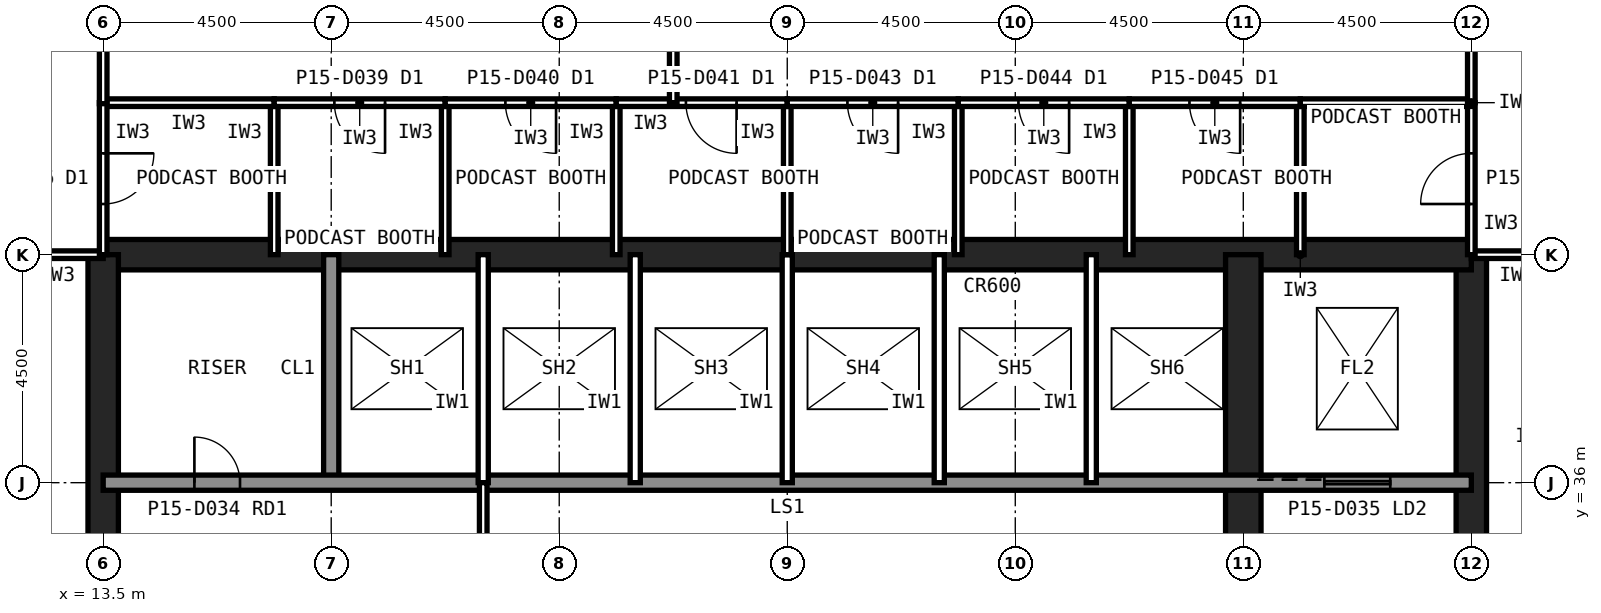
"""IFC4 building model, lengths in metres.
Left out: names, types, materials, properties, quantities, classifications, styles, units other than length and angle.
Written with IfcOpenShell. Run it as: python <this file> out.ifc"""

import sys

from ifc_helpers import new_model, si_unit, direction, frame, frame_2d, origin, place, context, subcontext, project, spatial, rectangle, extrude, element, fill, save


model = new_model("IFC4")
c1 = context("Model", 3, precision=1e-05, world=origin(), true_north=direction((0.0, 1.0)))
c2 = subcontext(c1, "Body", "Model", "MODEL_VIEW")
j1 = project(units=[si_unit("LENGTHUNIT", "METRE"), si_unit("PLANEANGLEUNIT", "RADIAN")], contexts=[c1])
p1 = place(None, origin())
s1 = spatial("IfcSite", under=j1, at=p1, CompositionType="ELEMENT")
p2 = place(p1, origin())
s2 = spatial("IfcBuilding", under=s1, at=p2, CompositionType="ELEMENT")
p3 = place(p2, frame((0.0, 0.0, 62.6)))
s3 = spatial("IfcBuildingStorey", under=s2, at=p3, CompositionType="ELEMENT", Elevation=62.6)
p4 = place(p3, frame((40.5, 13.5, 0.0), z_axis=(0.0, 0.0, 1.0), x_axis=(0.0, 1.0, 0.0)))
e1 = element("IfcWall", 1, at=p4, inside=s3, PredefinedType="SHEAR", context=c2, shape_type="SweptSolid", body=[
    extrude(rectangle(XDim=27.0, YDim=0.6, at=frame_2d((13.5, 0.0))), origin(), (0.0, 0.0, 1.0), 4.2),
])
p5 = place(p4, frame((5.85, 0.0, 0.0)))
e2 = element("IfcOpeningElement", 2, at=p5, cuts=e1, PredefinedType="OPENING", context=c2, shape_type="SweptSolid", body=[
    extrude(rectangle(XDim=1.8, YDim=2.1, at=frame_2d((0.9, 1.05))), frame((0.0, 0.31, 0.0), z_axis=(0.0, -1.0, 0.0), x_axis=(1.0, 0.0, 0.0)), (0.0, 0.0, 1.0), 0.62),
])
p6 = place(p4, frame((19.65, 0.0, 0.0)))
e3 = element("IfcOpeningElement", 3, at=p6, cuts=e1, PredefinedType="OPENING", context=c2, shape_type="SweptSolid", body=[
    extrude(rectangle(XDim=1.2, YDim=2.1, at=frame_2d((0.6, 1.05))), frame((0.0, 0.31, 0.0), z_axis=(0.0, -1.0, 0.0), x_axis=(1.0, 0.0, 0.0)), (0.0, 0.0, 1.0), 0.62),
])
p7 = place(p3, frame((40.5, 40.5, 0.0), z_axis=(0.0, 0.0, 1.0), x_axis=(-1.0, 0.0, 0.0)))
e4 = element("IfcWall", 4, at=p7, inside=s3, PredefinedType="SHEAR", context=c2, shape_type="SweptSolid", body=[
    extrude(rectangle(XDim=27.0, YDim=0.6, at=frame_2d((13.5, 0.0))), origin(), (0.0, 0.0, 1.0), 4.2),
])
p8 = place(p3, frame((13.5, 40.5, 0.0), z_axis=(0.0, 0.0, 1.0), x_axis=(0.0, -1.0, 0.0)))
e5 = element("IfcWall", 5, at=p8, inside=s3, PredefinedType="SHEAR", context=c2, shape_type="SweptSolid", body=[
    extrude(rectangle(XDim=27.0, YDim=0.6, at=frame_2d((13.5, 0.0))), origin(), (0.0, 0.0, 1.0), 4.2),
])
p9 = place(p8, frame((19.65, 0.0, 0.0)))
e6 = element("IfcOpeningElement", 6, at=p9, cuts=e5, PredefinedType="OPENING", context=c2, shape_type="SweptSolid", body=[
    extrude(rectangle(XDim=1.2, YDim=2.1, at=frame_2d((0.6, 1.05))), frame((0.0, 0.31, 0.0), z_axis=(0.0, -1.0, 0.0), x_axis=(1.0, 0.0, 0.0)), (0.0, 0.0, 1.0), 0.62),
])
p10 = place(p8, frame((5.85, 0.0, 0.0)))
e7 = element("IfcOpeningElement", 7, at=p10, cuts=e5, PredefinedType="OPENING", context=c2, shape_type="SweptSolid", body=[
    extrude(rectangle(XDim=1.8, YDim=2.1, at=frame_2d((0.9, 1.05))), frame((0.0, 0.31, 0.0), z_axis=(0.0, -1.0, 0.0), x_axis=(1.0, 0.0, 0.0)), (0.0, 0.0, 1.0), 0.62),
])
p11 = place(p3, frame((18.0, 36.0, 0.0), z_axis=(0.0, 0.0, 1.0), x_axis=(0.0, 1.0, 0.0)))
e8 = element("IfcWall", 8, at=p11, inside=s3, PredefinedType="SOLIDWALL", context=c2, shape_type="SweptSolid", body=[
    extrude(rectangle(XDim=4.5, YDim=0.3, at=frame_2d((2.25, 0.0))), origin(), (0.0, 0.0, 1.0), 4.04),
])
p12 = place(p3, frame((36.0, 22.5, 0.0), z_axis=(0.0, 0.0, 1.0), x_axis=(0.0, 1.0, 0.0)))
e9 = element("IfcWall", 9, at=p12, inside=s3, PredefinedType="SHEAR", context=c2, shape_type="SweptSolid", body=[
    extrude(rectangle(XDim=18.0, YDim=0.7, at=frame_2d((9.0, 0.0))), origin(), (0.0, 0.0, 1.0), 4.2),
])
p13 = place(p3, frame((13.5, 36.0, 0.0), z_axis=(0.0, 0.0, 1.0), x_axis=(1.0, 0.0, 0.0)))
e10 = element("IfcWall", 10, at=p13, inside=s3, PredefinedType="SOLIDWALL", context=c2, shape_type="SweptSolid", body=[
    extrude(rectangle(XDim=27.0, YDim=0.3, at=frame_2d((13.5, 0.0))), origin(), (0.0, 0.0, 1.0), 4.04),
])
p14 = place(p13, frame((1.8, 0.0, 0.0)))
e11 = element("IfcOpeningElement", 11, at=p14, cuts=e10, PredefinedType="OPENING", context=c2, shape_type="SweptSolid", body=[
    extrude(rectangle(XDim=0.9, YDim=2.1, at=frame_2d((0.45, 1.05))), frame((0.0, 0.16, 0.0), z_axis=(0.0, -1.0, 0.0), x_axis=(1.0, 0.0, 0.0)), (0.0, 0.0, 1.0), 0.32),
])
p15 = place(p13, frame((24.1, 0.0, 0.0)))
e12 = element("IfcOpeningElement", 12, at=p15, cuts=e10, PredefinedType="OPENING", context=c2, shape_type="SweptSolid", body=[
    extrude(rectangle(XDim=1.3, YDim=2.2, at=frame_2d((0.65, 1.1))), frame((0.0, 0.16, 0.0), z_axis=(0.0, -1.0, 0.0), x_axis=(1.0, 0.0, 0.0)), (0.0, 0.0, 1.0), 0.32),
])
for number, where, z_axis, x_axis in (
    (13, (21.0, 36.0, 0.0), (0.0, 0.0, 1.0), (0.0, 1.0, 0.0)),
    (14, (24.0, 36.0, 0.0), (0.0, 0.0, 1.0), (0.0, 1.0, 0.0)),
    (15, (27.0, 36.0, 0.0), (0.0, 0.0, 1.0), (0.0, 1.0, 0.0)),
    (16, (30.0, 36.0, 0.0), (0.0, 0.0, 1.0), (0.0, 1.0, 0.0)),
    (17, (33.0, 36.0, 0.0), (0.0, 0.0, 1.0), (0.0, 1.0, 0.0)),
):
    element("IfcWall", number, at=place(p3, frame(where, z_axis=z_axis, x_axis=x_axis)), inside=s3, PredefinedType="PARTITIONING", context=c2, shape_type="SweptSolid", body=[
        extrude(rectangle(XDim=4.5, YDim=0.2, at=frame_2d((2.25, 0.0))), origin(), (0.0, 0.0, 1.0), 4.04),
    ])
for number, where, z_axis, x_axis in (
    (18, (18.0, 33.3, 0.0), (0.0, 0.0, 1.0), (0.0, 1.0, 0.0)),
    (19, (24.0, 33.3, 0.0), (0.0, 0.0, 1.0), (0.0, 1.0, 0.0)),
    (20, (30.0, 33.3, 0.0), (0.0, 0.0, 1.0), (0.0, 1.0, 0.0)),
):
    element("IfcWall", number, at=place(p3, frame(where, z_axis=z_axis, x_axis=x_axis)), inside=s3, PredefinedType="PARTITIONING", context=c2, shape_type="SweptSolid", body=[
        extrude(rectangle(XDim=2.7, YDim=0.15, at=frame_2d((1.35, 0.0))), origin(), (0.0, 0.0, 1.0), 4.04),
    ])
for number, where, z_axis, x_axis in (
    (21, (13.5, 40.5, 0.0), (0.0, 0.0, 1.0), (-1.0, 0.0, 0.0)),
    (22, (42.3, 40.5, 0.0), (0.0, 0.0, 1.0), (-1.0, 0.0, 0.0)),
):
    element("IfcWall", number, at=place(p3, frame(where, z_axis=z_axis, x_axis=x_axis)), inside=s3, PredefinedType="PARTITIONING", context=c2, shape_type="SweptSolid", body=[
        extrude(rectangle(XDim=1.8, YDim=0.15, at=frame_2d((0.9, 0.0))), origin(), (0.0, 0.0, 1.0), 3.189),
    ])
p16 = place(p3, frame((16.875, 40.5, 0.0), z_axis=(0.0, 0.0, 1.0), x_axis=(0.0, 1.0, 0.0)))
e23 = element("IfcWall", 23, at=p16, inside=s3, PredefinedType="PARTITIONING", context=c2, shape_type="SweptSolid", body=[
    extrude(rectangle(XDim=3.0, YDim=0.15, at=frame_2d((1.5, 0.0))), origin(), (0.0, 0.0, 1.0), 4.04),
])
p17 = place(p3, frame((16.875, 43.5, 0.0), z_axis=(0.0, 0.0, 1.0), x_axis=(-1.0, 0.0, 0.0)))
e24 = element("IfcWall", 24, at=p17, inside=s3, PredefinedType="PARTITIONING", context=c2, shape_type="SweptSolid", body=[
    extrude(rectangle(XDim=3.375, YDim=0.15, at=frame_2d((1.688, 0.0))), origin(), (0.0, 0.0, 1.0), 4.04),
])
p18 = place(p3, frame((13.5, 43.5, 0.0), z_axis=(0.0, 0.0, 1.0), x_axis=(0.0, -1.0, 0.0)))
e25 = element("IfcWall", 25, at=p18, inside=s3, PredefinedType="PARTITIONING", context=c2, shape_type="SweptSolid", body=[
    extrude(rectangle(XDim=3.0, YDim=0.15, at=frame_2d((1.5, 0.0))), origin(), (0.0, 0.0, 1.0), 3.189),
])
p19 = place(p18, frame((1.0, 0.0, 0.0)))
e26 = element("IfcOpeningElement", 26, at=p19, cuts=e25, PredefinedType="OPENING", context=c2, shape_type="SweptSolid", body=[
    extrude(rectangle(XDim=1.0, YDim=2.1, at=frame_2d((0.5, 1.05))), frame((0.0, 0.085, 0.0), z_axis=(0.0, -1.0, 0.0), x_axis=(1.0, 0.0, 0.0)), (0.0, 0.0, 1.0), 0.17),
])
p20 = place(p3, frame((20.25, 40.5, 0.0), z_axis=(0.0, 0.0, 1.0), x_axis=(0.0, 1.0, 0.0)))
e27 = element("IfcWall", 27, at=p20, inside=s3, PredefinedType="PARTITIONING", context=c2, shape_type="SweptSolid", body=[
    extrude(rectangle(XDim=3.0, YDim=0.15, at=frame_2d((1.5, 0.0))), origin(), (0.0, 0.0, 1.0), 4.04),
])
p21 = place(p3, frame((20.25, 43.5, 0.0), z_axis=(0.0, 0.0, 1.0), x_axis=(-1.0, 0.0, 0.0)))
e28 = element("IfcWall", 28, at=p21, inside=s3, PredefinedType="PARTITIONING", context=c2, shape_type="SweptSolid", body=[
    extrude(rectangle(XDim=3.375, YDim=0.15, at=frame_2d((1.688, 0.0))), origin(), (0.0, 0.0, 1.0), 4.04),
])
p22 = place(p21, frame((1.188, 0.0, 0.0)))
e29 = element("IfcOpeningElement", 29, at=p22, cuts=e28, PredefinedType="OPENING", context=c2, shape_type="SweptSolid", body=[
    extrude(rectangle(XDim=1.0, YDim=2.1, at=frame_2d((0.5, 1.05))), frame((0.0, 0.085, 0.0), z_axis=(0.0, -1.0, 0.0), x_axis=(1.0, 0.0, 0.0)), (0.0, 0.0, 1.0), 0.17),
])
p23 = place(p3, frame((23.625, 40.5, 0.0), z_axis=(0.0, 0.0, 1.0), x_axis=(0.0, 1.0, 0.0)))
e30 = element("IfcWall", 30, at=p23, inside=s3, PredefinedType="PARTITIONING", context=c2, shape_type="SweptSolid", body=[
    extrude(rectangle(XDim=3.0, YDim=0.15, at=frame_2d((1.5, 0.0))), origin(), (0.0, 0.0, 1.0), 4.04),
])
p24 = place(p3, frame((23.625, 43.5, 0.0), z_axis=(0.0, 0.0, 1.0), x_axis=(-1.0, 0.0, 0.0)))
e31 = element("IfcWall", 31, at=p24, inside=s3, PredefinedType="PARTITIONING", context=c2, shape_type="SweptSolid", body=[
    extrude(rectangle(XDim=3.375, YDim=0.15, at=frame_2d((1.688, 0.0))), origin(), (0.0, 0.0, 1.0), 4.04),
])
p25 = place(p24, frame((1.188, 0.0, 0.0)))
e32 = element("IfcOpeningElement", 32, at=p25, cuts=e31, PredefinedType="OPENING", context=c2, shape_type="SweptSolid", body=[
    extrude(rectangle(XDim=1.0, YDim=2.1, at=frame_2d((0.5, 1.05))), frame((0.0, 0.085, 0.0), z_axis=(0.0, -1.0, 0.0), x_axis=(1.0, 0.0, 0.0)), (0.0, 0.0, 1.0), 0.17),
])
p26 = place(p3, frame((27.0, 40.5, 0.0), z_axis=(0.0, 0.0, 1.0), x_axis=(0.0, 1.0, 0.0)))
e33 = element("IfcWall", 33, at=p26, inside=s3, PredefinedType="PARTITIONING", context=c2, shape_type="SweptSolid", body=[
    extrude(rectangle(XDim=3.0, YDim=0.15, at=frame_2d((1.5, 0.0))), origin(), (0.0, 0.0, 1.0), 3.189),
])
p27 = place(p3, frame((27.0, 43.5, 0.0), z_axis=(0.0, 0.0, 1.0), x_axis=(-1.0, 0.0, 0.0)))
e34 = element("IfcWall", 34, at=p27, inside=s3, PredefinedType="PARTITIONING", context=c2, shape_type="SweptSolid", body=[
    extrude(rectangle(XDim=3.375, YDim=0.15, at=frame_2d((1.688, 0.0))), origin(), (0.0, 0.0, 1.0), 4.04),
])
p28 = place(p27, frame((1.0, 0.0, 0.0)))
e35 = element("IfcOpeningElement", 35, at=p28, cuts=e34, PredefinedType="OPENING", context=c2, shape_type="SweptSolid", body=[
    extrude(rectangle(XDim=1.0, YDim=2.1, at=frame_2d((0.5, 1.05))), frame((0.0, 0.085, 0.0), z_axis=(0.0, -1.0, 0.0), x_axis=(1.0, 0.0, 0.0)), (0.0, 0.0, 1.0), 0.17),
])
p29 = place(p3, frame((30.375, 40.5, 0.0), z_axis=(0.0, 0.0, 1.0), x_axis=(0.0, 1.0, 0.0)))
e36 = element("IfcWall", 36, at=p29, inside=s3, PredefinedType="PARTITIONING", context=c2, shape_type="SweptSolid", body=[
    extrude(rectangle(XDim=3.0, YDim=0.15, at=frame_2d((1.5, 0.0))), origin(), (0.0, 0.0, 1.0), 4.04),
])
p30 = place(p3, frame((30.375, 43.5, 0.0), z_axis=(0.0, 0.0, 1.0), x_axis=(-1.0, 0.0, 0.0)))
e37 = element("IfcWall", 37, at=p30, inside=s3, PredefinedType="PARTITIONING", context=c2, shape_type="SweptSolid", body=[
    extrude(rectangle(XDim=3.375, YDim=0.15, at=frame_2d((1.688, 0.0))), origin(), (0.0, 0.0, 1.0), 4.04),
])
p31 = place(p30, frame((1.188, 0.0, 0.0)))
e38 = element("IfcOpeningElement", 38, at=p31, cuts=e37, PredefinedType="OPENING", context=c2, shape_type="SweptSolid", body=[
    extrude(rectangle(XDim=1.0, YDim=2.1, at=frame_2d((0.5, 1.05))), frame((0.0, 0.085, 0.0), z_axis=(0.0, -1.0, 0.0), x_axis=(1.0, 0.0, 0.0)), (0.0, 0.0, 1.0), 0.17),
])
p32 = place(p3, frame((33.75, 40.5, 0.0), z_axis=(0.0, 0.0, 1.0), x_axis=(0.0, 1.0, 0.0)))
e39 = element("IfcWall", 39, at=p32, inside=s3, PredefinedType="PARTITIONING", context=c2, shape_type="SweptSolid", body=[
    extrude(rectangle(XDim=3.0, YDim=0.15, at=frame_2d((1.5, 0.0))), origin(), (0.0, 0.0, 1.0), 4.04),
])
p33 = place(p3, frame((33.75, 43.5, 0.0), z_axis=(0.0, 0.0, 1.0), x_axis=(-1.0, 0.0, 0.0)))
e40 = element("IfcWall", 40, at=p33, inside=s3, PredefinedType="PARTITIONING", context=c2, shape_type="SweptSolid", body=[
    extrude(rectangle(XDim=3.375, YDim=0.15, at=frame_2d((1.688, 0.0))), origin(), (0.0, 0.0, 1.0), 4.04),
])
p34 = place(p33, frame((1.188, 0.0, 0.0)))
e41 = element("IfcOpeningElement", 41, at=p34, cuts=e40, PredefinedType="OPENING", context=c2, shape_type="SweptSolid", body=[
    extrude(rectangle(XDim=1.0, YDim=2.1, at=frame_2d((0.5, 1.05))), frame((0.0, 0.085, 0.0), z_axis=(0.0, -1.0, 0.0), x_axis=(1.0, 0.0, 0.0)), (0.0, 0.0, 1.0), 0.17),
])
p35 = place(p3, frame((37.125, 40.5, 0.0), z_axis=(0.0, 0.0, 1.0), x_axis=(0.0, 1.0, 0.0)))
e42 = element("IfcWall", 42, at=p35, inside=s3, PredefinedType="PARTITIONING", context=c2, shape_type="SweptSolid", body=[
    extrude(rectangle(XDim=3.0, YDim=0.15, at=frame_2d((1.5, 0.0))), origin(), (0.0, 0.0, 1.0), 4.04),
])
p36 = place(p3, frame((37.125, 43.5, 0.0), z_axis=(0.0, 0.0, 1.0), x_axis=(-1.0, 0.0, 0.0)))
e43 = element("IfcWall", 43, at=p36, inside=s3, PredefinedType="PARTITIONING", context=c2, shape_type="SweptSolid", body=[
    extrude(rectangle(XDim=3.375, YDim=0.15, at=frame_2d((1.688, 0.0))), origin(), (0.0, 0.0, 1.0), 4.04),
])
p37 = place(p36, frame((1.188, 0.0, 0.0)))
e44 = element("IfcOpeningElement", 44, at=p37, cuts=e43, PredefinedType="OPENING", context=c2, shape_type="SweptSolid", body=[
    extrude(rectangle(XDim=1.0, YDim=2.1, at=frame_2d((0.5, 1.05))), frame((0.0, 0.085, 0.0), z_axis=(0.0, -1.0, 0.0), x_axis=(1.0, 0.0, 0.0)), (0.0, 0.0, 1.0), 0.17),
])
p38 = place(p3, frame((40.5, 40.5, 0.0), z_axis=(0.0, 0.0, 1.0), x_axis=(0.0, 1.0, 0.0)))
e45 = element("IfcWall", 45, at=p38, inside=s3, PredefinedType="PARTITIONING", context=c2, shape_type="SweptSolid", body=[
    extrude(rectangle(XDim=3.0, YDim=0.15, at=frame_2d((1.5, 0.0))), origin(), (0.0, 0.0, 1.0), 3.189),
])
p39 = place(p38, frame((1.0, 0.0, 0.0)))
e46 = element("IfcOpeningElement", 46, at=p39, cuts=e45, PredefinedType="OPENING", context=c2, shape_type="SweptSolid", body=[
    extrude(rectangle(XDim=1.0, YDim=2.1, at=frame_2d((0.5, 1.05))), frame((0.0, 0.085, 0.0), z_axis=(0.0, -1.0, 0.0), x_axis=(1.0, 0.0, 0.0)), (0.0, 0.0, 1.0), 0.17),
])
p40 = place(p3, frame((40.5, 43.5, 0.0), z_axis=(0.0, 0.0, 1.0), x_axis=(-1.0, 0.0, 0.0)))
e47 = element("IfcWall", 47, at=p40, inside=s3, PredefinedType="PARTITIONING", context=c2, shape_type="SweptSolid", body=[
    extrude(rectangle(XDim=3.375, YDim=0.15, at=frame_2d((1.688, 0.0))), origin(), (0.0, 0.0, 1.0), 4.04),
])
p41 = place(p3, frame((40.5, 53.555, 0.0), z_axis=(0.0, 0.0, 1.0), x_axis=(0.0, -1.0, 0.0)))
e48 = element("IfcWall", 48, at=p41, inside=s3, PredefinedType="PARTITIONING", context=c2, shape_type="SweptSolid", body=[
    extrude(rectangle(XDim=10.055, YDim=0.15, at=frame_2d((5.027, 0.0))), origin(), (0.0, 0.0, 1.0), 3.189),
])
p42 = place(p41, frame((4.528, 0.0, 0.0)))
e49 = element("IfcOpeningElement", 49, at=p42, cuts=e48, PredefinedType="OPENING", context=c2, shape_type="SweptSolid", body=[
    extrude(rectangle(XDim=1.0, YDim=2.1, at=frame_2d((0.5, 1.05))), frame((0.0, 0.085, 0.0), z_axis=(0.0, -1.0, 0.0), x_axis=(1.0, 0.0, 0.0)), (0.0, 0.0, 1.0), 0.17),
])
p43 = place(p3, frame((24.75, 43.5, 0.0), z_axis=(0.0, 0.0, 1.0), x_axis=(0.0, 1.0, 0.0)))
e50 = element("IfcWall", 50, at=p43, inside=s3, PredefinedType="PARTITIONING", context=c2, shape_type="SweptSolid", body=[
    extrude(rectangle(XDim=11.02, YDim=0.15, at=frame_2d((5.51, 0.0))), origin(), (0.0, 0.0, 1.0), 4.04),
])
p44 = place(p43, frame((4.75, 0.0, 0.0)))
e51 = element("IfcOpeningElement", 51, at=p44, cuts=e50, PredefinedType="OPENING", context=c2, shape_type="SweptSolid", body=[
    extrude(rectangle(XDim=1.0, YDim=2.1, at=frame_2d((0.5, 1.05))), frame((0.0, 0.085, 0.0), z_axis=(0.0, -1.0, 0.0), x_axis=(1.0, 0.0, 0.0)), (0.0, 0.0, 1.0), 0.17),
])
p45 = place(p3, frame((13.5, 50.4, 0.0), z_axis=(0.0, 0.0, 1.0), x_axis=(0.0, -1.0, 0.0)))
e52 = element("IfcWall", 52, at=p45, inside=s3, PredefinedType="PARTITIONING", context=c2, shape_type="SweptSolid", body=[
    extrude(rectangle(XDim=6.92, YDim=0.15, at=frame_2d((3.46, 0.0))), origin(), (0.0, 0.0, 1.0), 3.189),
])
p46 = place(p45, frame((2.96, 0.0, 0.0)))
e53 = element("IfcOpeningElement", 53, at=p46, cuts=e52, PredefinedType="OPENING", context=c2, shape_type="SweptSolid", body=[
    extrude(rectangle(XDim=1.0, YDim=2.1, at=frame_2d((0.5, 1.05))), frame((0.0, 0.085, 0.0), z_axis=(0.0, -1.0, 0.0), x_axis=(1.0, 0.0, 0.0)), (0.0, 0.0, 1.0), 0.17),
])
p47 = place(p14, origin())
e54 = element("IfcDoor", 54, at=p47, inside=s3, OperationType="SINGLE_SWING_LEFT", PredefinedType="DOOR", context=c2, shape_type="SweptSolid", body=[
    extrude(rectangle(XDim=0.9, YDim=2.1, at=frame_2d((0.45, 1.05))), frame((0.0, 0.025, 0.0), z_axis=(0.0, -1.0, 0.0), x_axis=(1.0, 0.0, 0.0)), (0.0, 0.0, 1.0), 0.05),
])
fill(e11, e54)
p48 = place(p15, origin())
e55 = element("IfcDoor", 55, at=p48, inside=s3, OperationType="SLIDING_TO_LEFT", PredefinedType="DOOR", context=c2, shape_type="SweptSolid", body=[
    extrude(rectangle(XDim=1.3, YDim=2.2, at=frame_2d((0.65, 1.1))), frame((0.0, 0.025, 0.0), z_axis=(0.0, -1.0, 0.0), x_axis=(1.0, 0.0, 0.0)), (0.0, 0.0, 1.0), 0.05),
])
fill(e12, e55)
p49 = place(p19, origin())
e56 = element("IfcDoor", 56, at=p49, inside=s3, OperationType="SINGLE_SWING_LEFT", PredefinedType="DOOR", context=c2, shape_type="SweptSolid", body=[
    extrude(rectangle(XDim=1.0, YDim=2.1, at=frame_2d((0.5, 1.05))), frame((0.0, 0.025, 0.0), z_axis=(0.0, -1.0, 0.0), x_axis=(1.0, 0.0, 0.0)), (0.0, 0.0, 1.0), 0.05),
])
fill(e26, e56)
p50 = place(p22, origin())
e57 = element("IfcDoor", 57, at=p50, inside=s3, OperationType="SINGLE_SWING_LEFT", PredefinedType="DOOR", context=c2, shape_type="SweptSolid", body=[
    extrude(rectangle(XDim=1.0, YDim=2.1, at=frame_2d((0.5, 1.05))), frame((0.0, 0.025, 0.0), z_axis=(0.0, -1.0, 0.0), x_axis=(1.0, 0.0, 0.0)), (0.0, 0.0, 1.0), 0.05),
])
fill(e29, e57)
p51 = place(p25, origin())
e58 = element("IfcDoor", 58, at=p51, inside=s3, OperationType="SINGLE_SWING_LEFT", PredefinedType="DOOR", context=c2, shape_type="SweptSolid", body=[
    extrude(rectangle(XDim=1.0, YDim=2.1, at=frame_2d((0.5, 1.05))), frame((0.0, 0.025, 0.0), z_axis=(0.0, -1.0, 0.0), x_axis=(1.0, 0.0, 0.0)), (0.0, 0.0, 1.0), 0.05),
])
fill(e32, e58)
p52 = place(p28, origin())
e59 = element("IfcDoor", 59, at=p52, inside=s3, OperationType="SINGLE_SWING_LEFT", PredefinedType="DOOR", context=c2, shape_type="SweptSolid", body=[
    extrude(rectangle(XDim=1.0, YDim=2.1, at=frame_2d((0.5, 1.05))), frame((0.0, 0.025, 0.0), z_axis=(0.0, -1.0, 0.0), x_axis=(1.0, 0.0, 0.0)), (0.0, 0.0, 1.0), 0.05),
])
fill(e35, e59)
p53 = place(p31, origin())
e60 = element("IfcDoor", 60, at=p53, inside=s3, OperationType="SINGLE_SWING_LEFT", PredefinedType="DOOR", context=c2, shape_type="SweptSolid", body=[
    extrude(rectangle(XDim=1.0, YDim=2.1, at=frame_2d((0.5, 1.05))), frame((0.0, 0.025, 0.0), z_axis=(0.0, -1.0, 0.0), x_axis=(1.0, 0.0, 0.0)), (0.0, 0.0, 1.0), 0.05),
])
fill(e38, e60)
p54 = place(p34, origin())
e61 = element("IfcDoor", 61, at=p54, inside=s3, OperationType="SINGLE_SWING_LEFT", PredefinedType="DOOR", context=c2, shape_type="SweptSolid", body=[
    extrude(rectangle(XDim=1.0, YDim=2.1, at=frame_2d((0.5, 1.05))), frame((0.0, 0.025, 0.0), z_axis=(0.0, -1.0, 0.0), x_axis=(1.0, 0.0, 0.0)), (0.0, 0.0, 1.0), 0.05),
])
fill(e41, e61)
p55 = place(p37, origin())
e62 = element("IfcDoor", 62, at=p55, inside=s3, OperationType="SINGLE_SWING_LEFT", PredefinedType="DOOR", context=c2, shape_type="SweptSolid", body=[
    extrude(rectangle(XDim=1.0, YDim=2.1, at=frame_2d((0.5, 1.05))), frame((0.0, 0.025, 0.0), z_axis=(0.0, -1.0, 0.0), x_axis=(1.0, 0.0, 0.0)), (0.0, 0.0, 1.0), 0.05),
])
fill(e44, e62)
p56 = place(p39, origin())
e63 = element("IfcDoor", 63, at=p56, inside=s3, OperationType="SINGLE_SWING_LEFT", PredefinedType="DOOR", context=c2, shape_type="SweptSolid", body=[
    extrude(rectangle(XDim=1.0, YDim=2.1, at=frame_2d((0.5, 1.05))), frame((0.0, 0.025, 0.0), z_axis=(0.0, -1.0, 0.0), x_axis=(1.0, 0.0, 0.0)), (0.0, 0.0, 1.0), 0.05),
])
fill(e46, e63)
save(model, sys.argv[1])
